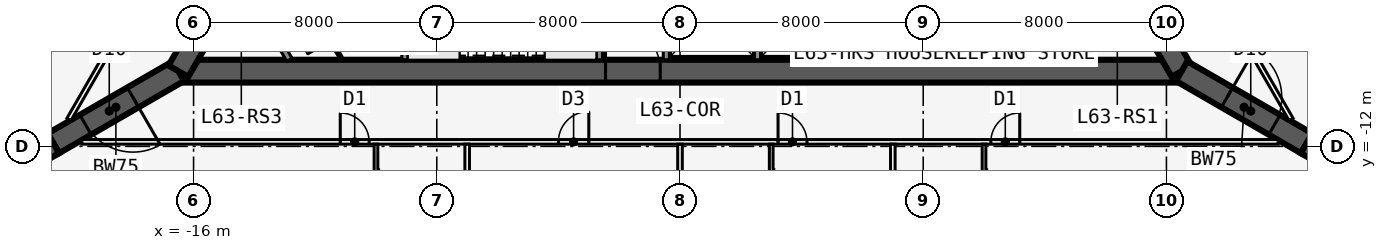
"""IFC4 building model, lengths in metres.
Left out: names, types, materials, properties, quantities, classifications, styles, units other than length and angle.
Written with IfcOpenShell. Run it as: python <this file> out.ifc"""

import sys

from ifc_helpers import new_model, si_unit, direction, frame, frame_2d, origin, place, context, subcontext, project, spatial, polyline, rectangle, outline, extrude, element, fill, save


model = new_model("IFC4")
c1 = context("Model", 3, precision=1e-05, world=origin(), true_north=direction((0.0, 1.0)))
c2 = subcontext(c1, "Body", "Model", "MODEL_VIEW")
j1 = project(units=[si_unit("LENGTHUNIT", "METRE"), si_unit("PLANEANGLEUNIT", "RADIAN")], contexts=[c1])
p1 = place(None, origin())
s1 = spatial("IfcSite", under=j1, at=p1, CompositionType="ELEMENT")
p2 = place(p1, origin())
s2 = spatial("IfcBuilding", under=s1, at=p2, CompositionType="ELEMENT")
p3 = place(p2, frame((0.0, 0.0, 239.3)))
s3 = spatial("IfcBuildingStorey", under=s2, at=p3, CompositionType="ELEMENT", Elevation=239.3)
p4 = place(p3, frame((-16.5, -9.526, 0.0), z_axis=(0.0, 0.0, 1.0), x_axis=(1.0, 0.0, 0.0)))
e1 = element("IfcWall", 1, at=p4, inside=s3, PredefinedType="SHEAR", context=c2, shape_type="SweptSolid", body=[
    extrude(rectangle(XDim=33.0, YDim=0.75, at=frame_2d((16.5, 0.0))), origin(), (0.0, 0.0, 1.0), 3.6),
])
p5 = place(p4, frame((14.05, 0.0, 0.0)))
e2 = element("IfcOpeningElement", 2, at=p5, cuts=e1, PredefinedType="OPENING", context=c2, shape_type="SweptSolid", body=[
    extrude(rectangle(XDim=1.8, YDim=2.13, at=frame_2d((0.9, 1.065))), frame((0.0, 0.385, 0.0), z_axis=(0.0, -1.0, 0.0), x_axis=(1.0, 0.0, 0.0)), (0.0, 0.0, 1.0), 0.77),
])
p6 = place(p3, frame((-9.05, -5.951, 0.0), z_axis=(0.0, 0.0, 1.0), x_axis=(0.0, -1.0, 0.0)))
e3 = element("IfcWall", 3, at=p6, inside=s3, PredefinedType="SOLIDWALL", context=c2, shape_type="SweptSolid", body=[
    extrude(rectangle(XDim=3.2, YDim=0.2, at=frame_2d((1.6, 0.0))), origin(), (0.0, 0.0, 1.0), 3.435),
])
p7 = place(p3, frame((-2.65, -5.951, 0.0), z_axis=(0.0, 0.0, 1.0), x_axis=(0.0, -1.0, 0.0)))
e4 = element("IfcWall", 4, at=p7, inside=s3, PredefinedType="SOLIDWALL", context=c2, shape_type="SweptSolid", body=[
    extrude(rectangle(XDim=3.2, YDim=0.2, at=frame_2d((1.6, 0.0))), origin(), (0.0, 0.0, 1.0), 3.435),
])
p8 = place(p7, frame((1.6, 0.0, 0.0)))
e5 = element("IfcOpeningElement", 5, at=p8, cuts=e4, PredefinedType="OPENING", context=c2, shape_type="SweptSolid", body=[
    extrude(rectangle(XDim=1.0, YDim=2.13, at=frame_2d((0.5, 1.065))), frame((0.0, 0.11, 0.0), z_axis=(0.0, -1.0, 0.0), x_axis=(1.0, 0.0, 0.0)), (0.0, 0.0, 1.0), 0.22),
])
for number, where, z_axis, x_axis in (
    (6, (-0.45, -5.951, 0.0), (0.0, 0.0, 1.0), (0.0, -1.0, 0.0)),
    (7, (2.55, -5.951, 0.0), (0.0, 0.0, 1.0), (0.0, -1.0, 0.0)),
    (8, (5.55, -5.951, 0.0), (0.0, 0.0, 1.0), (0.0, -1.0, 0.0)),
    (9, (8.45, -5.951, 0.0), (0.0, 0.0, 1.0), (0.0, -1.0, 0.0)),
):
    element("IfcWall", number, at=place(p3, frame(where, z_axis=z_axis, x_axis=x_axis)), inside=s3, PredefinedType="SOLIDWALL", context=c2, shape_type="SweptSolid", body=[
        extrude(rectangle(XDim=3.2, YDim=0.2, at=frame_2d((1.6, 0.0))), origin(), (0.0, 0.0, 1.0), 3.435),
    ])
p9 = place(p3, frame((16.5, -9.526, 0.0), z_axis=(0.0, 0.0, 1.0), x_axis=(-0.499999749417, 0.866025548458, 0.0)))
e10 = element("IfcWall", 10, at=p9, inside=s3, PredefinedType="SHEAR", context=c2, shape_type="SweptSolid", body=[
    extrude(rectangle(XDim=33.0, YDim=0.75, at=frame_2d((16.5, 0.0))), origin(), (0.0, 0.0, 1.0), 3.6),
])
p10 = place(p9, frame((14.15, 0.0, 0.0)))
e11 = element("IfcOpeningElement", 11, at=p10, cuts=e10, PredefinedType="OPENING", context=c2, shape_type="SweptSolid", body=[
    extrude(rectangle(XDim=1.8, YDim=2.13, at=frame_2d((0.9, 1.065))), frame((0.0, 0.385, 0.0), z_axis=(0.0, -1.0, 0.0), x_axis=(1.0, 0.0, 0.0)), (0.0, 0.0, 1.0), 0.77),
])
p11 = place(p9, frame((12.6, 0.0, 0.0)))
e12 = element("IfcOpeningElement", 12, at=p11, cuts=e10, PredefinedType="OPENING", context=c2, shape_type="SweptSolid", body=[
    extrude(rectangle(XDim=1.0, YDim=2.13, at=frame_2d((0.5, 1.065))), frame((0.0, 0.385, 0.0), z_axis=(0.0, -1.0, 0.0), x_axis=(1.0, 0.0, 0.0)), (0.0, 0.0, 1.0), 0.77),
])
p12 = place(p3, frame((0.0, 19.052, 0.0), z_axis=(0.0, 0.0, 1.0), x_axis=(-0.499999749417, -0.866025548458, 0.0)))
e13 = element("IfcWall", 13, at=p12, inside=s3, PredefinedType="SHEAR", context=c2, shape_type="SweptSolid", body=[
    extrude(rectangle(XDim=33.0, YDim=0.75, at=frame_2d((16.5, 0.0))), origin(), (0.0, 0.0, 1.0), 3.6),
])
p13 = place(p12, frame((14.15, 0.0, 0.0)))
e14 = element("IfcOpeningElement", 14, at=p13, cuts=e13, PredefinedType="OPENING", context=c2, shape_type="SweptSolid", body=[
    extrude(rectangle(XDim=1.8, YDim=2.13, at=frame_2d((0.9, 1.065))), frame((0.0, 0.385, 0.0), z_axis=(0.0, -1.0, 0.0), x_axis=(1.0, 0.0, 0.0)), (0.0, 0.0, 1.0), 0.77),
])
p14 = place(p12, frame((12.6, 0.0, 0.0)))
e15 = element("IfcOpeningElement", 15, at=p14, cuts=e13, PredefinedType="OPENING", context=c2, shape_type="SweptSolid", body=[
    extrude(rectangle(XDim=1.0, YDim=2.13, at=frame_2d((0.5, 1.065))), frame((0.0, 0.385, 0.0), z_axis=(0.0, -1.0, 0.0), x_axis=(1.0, 0.0, 0.0)), (0.0, 0.0, 1.0), 0.77),
])
p15 = place(p3, frame((16.5, -9.526, 0.0), z_axis=(0.0, 0.0, 1.0), x_axis=(0.866031398331, -0.499989616998, 0.0)))
e16 = element("IfcWall", 16, at=p15, inside=s3, PredefinedType="SHEAR", context=c2, shape_type="SweptSolid", body=[
    extrude(rectangle(XDim=4.746, YDim=0.75, at=frame_2d((2.373, 0.0))), origin(), (0.0, 0.0, 1.0), 3.6),
])
p16 = place(p15, frame((1.725, 0.0, 0.0)))
e17 = element("IfcOpeningElement", 17, at=p16, cuts=e16, PredefinedType="OPENING", context=c2, shape_type="SweptSolid", body=[
    extrude(rectangle(XDim=1.8, YDim=2.13, at=frame_2d((0.9, 1.065))), frame((0.0, 0.385, 0.0), z_axis=(0.0, -1.0, 0.0), x_axis=(1.0, 0.0, 0.0)), (0.0, 0.0, 1.0), 0.77),
])
p17 = place(p3, frame((20.61, -11.899, 0.0), z_axis=(0.0, 0.0, 1.0), x_axis=(0.866009537788, -0.500027479704, 0.0)))
e18 = element("IfcWall", 18, at=p17, inside=s3, PredefinedType="SHEAR", context=c2, shape_type="SweptSolid", body=[
    extrude(rectangle(XDim=1.155, YDim=0.75, at=frame_2d((0.577, 0.0))), origin(), (0.0, 0.0, 1.0), 3.6),
])
p18 = place(p3, frame((-16.5, -9.526, 0.0), z_axis=(0.0, 0.0, 1.0), x_axis=(-0.866031398331, -0.499989616998, 0.0)))
e19 = element("IfcWall", 19, at=p18, inside=s3, PredefinedType="SHEAR", context=c2, shape_type="SweptSolid", body=[
    extrude(rectangle(XDim=4.746, YDim=0.75, at=frame_2d((2.373, 0.0))), origin(), (0.0, 0.0, 1.0), 3.6),
])
p19 = place(p18, frame((1.725, 0.0, 0.0)))
e20 = element("IfcOpeningElement", 20, at=p19, cuts=e19, PredefinedType="OPENING", context=c2, shape_type="SweptSolid", body=[
    extrude(rectangle(XDim=1.8, YDim=2.13, at=frame_2d((0.9, 1.065))), frame((0.0, 0.385, 0.0), z_axis=(0.0, -1.0, 0.0), x_axis=(1.0, 0.0, 0.0)), (0.0, 0.0, 1.0), 0.77),
])
p20 = place(p3, frame((-20.61, -11.899, 0.0), z_axis=(0.0, 0.0, 1.0), x_axis=(-0.866009537788, -0.500027479704, 0.0)))
e21 = element("IfcWall", 21, at=p20, inside=s3, PredefinedType="SHEAR", context=c2, shape_type="SweptSolid", body=[
    extrude(rectangle(XDim=1.155, YDim=0.75, at=frame_2d((0.577, 0.0))), origin(), (0.0, 0.0, 1.0), 3.6),
])
p21 = place(p3, frame((18.46, -15.924, 0.0), z_axis=(0.0, 0.0, 1.0), x_axis=(0.707081252484, 0.707132308968, 0.0)))
e22 = element("IfcWall", 22, at=p21, inside=s3, PredefinedType="SOLIDWALL", context=c2, shape_type="SweptSolid", body=[
    extrude(outline(polyline([(4.782, 0.225), (4.723, 0.225), (4.303, 0.113), (4.273, 0.225), (0.0, 0.225), (0.0, -0.225), (4.782, -0.225), (4.782, 0.225)])), origin(), (0.0, 0.0, 1.0), 3.435),
])
p22 = place(p21, frame((0.711, 0.0, 0.45)))
e23 = element("IfcOpeningElement", 23, at=p22, cuts=e22, PredefinedType="OPENING", context=c2, shape_type="SweptSolid", body=[
    extrude(rectangle(XDim=3.0, YDim=2.6, at=frame_2d((1.5, 1.3))), frame((0.0, 0.235, 0.0), z_axis=(0.0, -1.0, 0.0), x_axis=(1.0, 0.0, 0.0)), (0.0, 0.0, 1.0), 0.47),
])
p23 = place(p3, frame((-21.841, -12.542, 0.0), z_axis=(0.0, 0.0, 1.0), x_axis=(0.707081252484, -0.707132308968, 0.0)))
e24 = element("IfcWall", 24, at=p23, inside=s3, PredefinedType="SOLIDWALL", context=c2, shape_type="SweptSolid", body=[
    extrude(outline(polyline([(4.782, 0.225), (0.509, 0.225), (0.479, 0.113), (0.059, 0.225), (0.0, 0.225), (0.0, -0.225), (4.782, -0.225), (4.782, 0.225)])), origin(), (0.0, 0.0, 1.0), 3.435),
])
p24 = place(p23, frame((1.07, 0.0, 0.45)))
e25 = element("IfcOpeningElement", 25, at=p24, cuts=e24, PredefinedType="OPENING", context=c2, shape_type="SweptSolid", body=[
    extrude(rectangle(XDim=3.0, YDim=2.6, at=frame_2d((1.5, 1.3))), frame((0.0, 0.235, 0.0), z_axis=(0.0, -1.0, 0.0), x_axis=(1.0, 0.0, 0.0)), (0.0, 0.0, 1.0), 0.47),
])
p25 = place(p3, frame((-19.677, -11.851, 0.0), z_axis=(0.0, 0.0, 1.0), x_axis=(1.0, 0.0, 0.0)))
e26 = element("IfcWall", 26, at=p25, inside=s3, PredefinedType="PARTITIONING", context=c2, shape_type="SweptSolid", body=[
    extrude(rectangle(XDim=39.354, YDim=0.15, at=frame_2d((19.677, 0.0))), origin(), (0.0, 0.0, 1.0), 3.435),
])
p26 = place(p25, frame((8.502, 0.0, 0.0)))
e27 = element("IfcOpeningElement", 27, at=p26, cuts=e26, PredefinedType="OPENING", context=c2, shape_type="SweptSolid", body=[
    extrude(rectangle(XDim=0.95, YDim=2.13, at=frame_2d((0.475, 1.065))), frame((0.0, 0.085, 0.0), z_axis=(0.0, -1.0, 0.0), x_axis=(1.0, 0.0, 0.0)), (0.0, 0.0, 1.0), 0.17),
])
p27 = place(p25, frame((15.677, 0.0, 0.0)))
e28 = element("IfcOpeningElement", 28, at=p27, cuts=e26, PredefinedType="OPENING", context=c2, shape_type="SweptSolid", body=[
    extrude(rectangle(XDim=1.0, YDim=2.13, at=frame_2d((0.5, 1.065))), frame((0.0, 0.085, 0.0), z_axis=(0.0, -1.0, 0.0), x_axis=(1.0, 0.0, 0.0)), (0.0, 0.0, 1.0), 0.17),
])
p28 = place(p25, frame((22.902, 0.0, 0.0)))
e29 = element("IfcOpeningElement", 29, at=p28, cuts=e26, PredefinedType="OPENING", context=c2, shape_type="SweptSolid", body=[
    extrude(rectangle(XDim=0.95, YDim=2.13, at=frame_2d((0.475, 1.065))), frame((0.0, 0.085, 0.0), z_axis=(0.0, -1.0, 0.0), x_axis=(1.0, 0.0, 0.0)), (0.0, 0.0, 1.0), 0.17),
])
p29 = place(p25, frame((29.902, 0.0, 0.0)))
e30 = element("IfcOpeningElement", 30, at=p29, cuts=e26, PredefinedType="OPENING", context=c2, shape_type="SweptSolid", body=[
    extrude(rectangle(XDim=0.95, YDim=2.13, at=frame_2d((0.475, 1.065))), frame((0.0, 0.085, 0.0), z_axis=(0.0, -1.0, 0.0), x_axis=(1.0, 0.0, 0.0)), (0.0, 0.0, 1.0), 0.17),
])
p30 = place(p3, frame((-7.0, -11.926, 0.0), z_axis=(0.0, 0.0, 1.0), x_axis=(0.0, -1.0, 0.0)))
e31 = element("IfcWall", 31, at=p30, inside=s3, PredefinedType="PARTITIONING", context=c2, shape_type="SweptSolid", body=[
    extrude(rectangle(XDim=6.609, YDim=0.15, at=frame_2d((3.304, 0.0))), origin(), (0.0, 0.0, 1.0), 2.678),
])
p31 = place(p3, frame((0.0, -11.926, 0.0), z_axis=(0.0, 0.0, 1.0), x_axis=(0.0, -1.0, 0.0)))
e32 = element("IfcWall", 32, at=p31, inside=s3, PredefinedType="PARTITIONING", context=c2, shape_type="SweptSolid", body=[
    extrude(rectangle(XDim=6.854, YDim=0.15, at=frame_2d((3.427, 0.0))), origin(), (0.0, 0.0, 1.0), 2.678),
])
p32 = place(p3, frame((7.0, -11.926, 0.0), z_axis=(0.0, 0.0, 1.0), x_axis=(0.0, -1.0, 0.0)))
e33 = element("IfcWall", 33, at=p32, inside=s3, PredefinedType="PARTITIONING", context=c2, shape_type="SweptSolid", body=[
    extrude(rectangle(XDim=6.609, YDim=0.15, at=frame_2d((3.304, 0.0))), origin(), (0.0, 0.0, 1.0), 2.678),
])
p33 = place(p3, frame((-10.0, -11.926, 0.0), z_axis=(0.0, 0.0, 1.0), x_axis=(0.0, -1.0, 0.0)))
e34 = element("IfcWall", 34, at=p33, inside=s3, PredefinedType="PLUMBINGWALL", context=c2, shape_type="SweptSolid", body=[
    extrude(rectangle(XDim=2.74, YDim=0.12, at=frame_2d((1.37, 0.0))), origin(), (0.0, 0.0, 1.0), 3.435),
])
p34 = place(p33, frame((1.55, 0.0, 0.0)))
e35 = element("IfcOpeningElement", 35, at=p34, cuts=e34, PredefinedType="OPENING", context=c2, shape_type="SweptSolid", body=[
    extrude(rectangle(XDim=0.9, YDim=2.13, at=frame_2d((0.45, 1.065))), frame((0.0, 0.07, 0.0), z_axis=(0.0, -1.0, 0.0), x_axis=(1.0, 0.0, 0.0)), (0.0, 0.0, 1.0), 0.14),
])
p35 = place(p3, frame((3.0, -11.926, 0.0), z_axis=(0.0, 0.0, 1.0), x_axis=(0.0, -1.0, 0.0)))
e36 = element("IfcWall", 36, at=p35, inside=s3, PredefinedType="PLUMBINGWALL", context=c2, shape_type="SweptSolid", body=[
    extrude(rectangle(XDim=2.74, YDim=0.12, at=frame_2d((1.37, 0.0))), origin(), (0.0, 0.0, 1.0), 3.435),
])
p36 = place(p35, frame((1.55, 0.0, 0.0)))
e37 = element("IfcOpeningElement", 37, at=p36, cuts=e36, PredefinedType="OPENING", context=c2, shape_type="SweptSolid", body=[
    extrude(rectangle(XDim=0.9, YDim=2.13, at=frame_2d((0.45, 1.065))), frame((0.0, 0.07, 0.0), z_axis=(0.0, -1.0, 0.0), x_axis=(1.0, 0.0, 0.0)), (0.0, 0.0, 1.0), 0.14),
])
p37 = place(p3, frame((10.0, -11.926, 0.0), z_axis=(0.0, 0.0, 1.0), x_axis=(0.0, -1.0, 0.0)))
e38 = element("IfcWall", 38, at=p37, inside=s3, PredefinedType="PLUMBINGWALL", context=c2, shape_type="SweptSolid", body=[
    extrude(rectangle(XDim=2.74, YDim=0.12, at=frame_2d((1.37, 0.0))), origin(), (0.0, 0.0, 1.0), 3.435),
])
p38 = place(p37, frame((1.55, 0.0, 0.0)))
e39 = element("IfcOpeningElement", 39, at=p38, cuts=e38, PredefinedType="OPENING", context=c2, shape_type="SweptSolid", body=[
    extrude(rectangle(XDim=0.9, YDim=2.13, at=frame_2d((0.45, 1.065))), frame((0.0, 0.07, 0.0), z_axis=(0.0, -1.0, 0.0), x_axis=(1.0, 0.0, 0.0)), (0.0, 0.0, 1.0), 0.14),
])
p39 = place(p3, frame((20.102, -11.115, 0.0), z_axis=(0.0, 0.0, 1.0), x_axis=(-0.500001960654, 0.866024271797, 0.0)))
e40 = element("IfcWall", 40, at=p39, inside=s3, PredefinedType="PARTITIONING", context=c2, shape_type="SweptSolid", body=[
    extrude(rectangle(XDim=12.677, YDim=0.15, at=frame_2d((6.339, 0.0))), origin(), (0.0, 0.0, 1.0), 3.435),
])
p40 = place(p39, frame((8.502, 0.0, 0.0)))
e41 = element("IfcOpeningElement", 41, at=p40, cuts=e40, PredefinedType="OPENING", context=c2, shape_type="SweptSolid", body=[
    extrude(rectangle(XDim=0.95, YDim=2.13, at=frame_2d((0.475, 1.065))), frame((0.0, 0.085, 0.0), z_axis=(0.0, -1.0, 0.0), x_axis=(1.0, 0.0, 0.0)), (0.0, 0.0, 1.0), 0.17),
])
p41 = place(p3, frame((-0.425, 22.966, 0.0), z_axis=(0.0, 0.0, 1.0), x_axis=(-0.500000265775, -0.866025250339, 0.0)))
e42 = element("IfcWall", 42, at=p41, inside=s3, PredefinedType="PARTITIONING", context=c2, shape_type="SweptSolid", body=[
    extrude(rectangle(XDim=39.354, YDim=0.15, at=frame_2d((19.677, 0.0))), origin(), (0.0, 0.0, 1.0), 3.435),
])
p42 = place(p41, frame((8.502, 0.0, 0.0)))
e43 = element("IfcOpeningElement", 43, at=p42, cuts=e42, PredefinedType="OPENING", context=c2, shape_type="SweptSolid", body=[
    extrude(rectangle(XDim=0.95, YDim=2.13, at=frame_2d((0.475, 1.065))), frame((0.0, 0.085, 0.0), z_axis=(0.0, -1.0, 0.0), x_axis=(1.0, 0.0, 0.0)), (0.0, 0.0, 1.0), 0.17),
])
p43 = place(p41, frame((15.902, 0.0, 0.0)))
e44 = element("IfcOpeningElement", 44, at=p43, cuts=e42, PredefinedType="OPENING", context=c2, shape_type="SweptSolid", body=[
    extrude(rectangle(XDim=0.95, YDim=2.13, at=frame_2d((0.475, 1.065))), frame((0.0, 0.085, 0.0), z_axis=(0.0, -1.0, 0.0), x_axis=(1.0, 0.0, 0.0)), (0.0, 0.0, 1.0), 0.17),
])
p44 = place(p41, frame((22.902, 0.0, 0.0)))
e45 = element("IfcOpeningElement", 45, at=p44, cuts=e42, PredefinedType="OPENING", context=c2, shape_type="SweptSolid", body=[
    extrude(rectangle(XDim=0.95, YDim=2.13, at=frame_2d((0.475, 1.065))), frame((0.0, 0.085, 0.0), z_axis=(0.0, -1.0, 0.0), x_axis=(1.0, 0.0, 0.0)), (0.0, 0.0, 1.0), 0.17),
])
p45 = place(p41, frame((29.902, 0.0, 0.0)))
e46 = element("IfcOpeningElement", 46, at=p45, cuts=e42, PredefinedType="OPENING", context=c2, shape_type="SweptSolid", body=[
    extrude(rectangle(XDim=0.95, YDim=2.13, at=frame_2d((0.475, 1.065))), frame((0.0, 0.085, 0.0), z_axis=(0.0, -1.0, 0.0), x_axis=(1.0, 0.0, 0.0)), (0.0, 0.0, 1.0), 0.17),
])
p46 = place(p3, frame((14.349, -6.551, 0.0), z_axis=(0.0, 0.0, 1.0), x_axis=(-0.499952404951, -0.866052881055, 0.0)))
e47 = element("IfcWall", 47, at=p46, inside=s3, PredefinedType="SOLIDWALL", context=c2, shape_type="SweptSolid", body=[
    extrude(rectangle(XDim=3.002, YDim=0.2, at=frame_2d((1.501, 0.0))), origin(), (0.0, 0.0, 1.0), 3.435),
])
p47 = place(p3, frame((12.964, -4.151, 0.0), z_axis=(0.0, 0.0, 1.0), x_axis=(-0.500027479704, -0.866009537788, 0.0)))
e48 = element("IfcWall", 48, at=p47, inside=s3, PredefinedType="PARTITIONING", context=c2, shape_type="SweptSolid", body=[
    extrude(rectangle(XDim=5.774, YDim=0.1, at=frame_2d((2.887, 0.0))), origin(), (0.0, 0.0, 1.0), 3.435),
])
p48 = place(p47, frame((2.437, 0.0, 0.0)))
e49 = element("IfcOpeningElement", 49, at=p48, cuts=e48, PredefinedType="OPENING", context=c2, shape_type="SweptSolid", body=[
    extrude(rectangle(XDim=0.9, YDim=2.13, at=frame_2d((0.45, 1.065))), frame((0.0, 0.06, 0.0), z_axis=(0.0, -1.0, 0.0), x_axis=(1.0, 0.0, 0.0)), (0.0, 0.0, 1.0), 0.12),
])
p49 = place(p3, frame((-12.848, -9.151, 0.0), z_axis=(0.0, 0.0, 1.0), x_axis=(-0.499952404951, 0.866052881055, 0.0)))
e50 = element("IfcWall", 50, at=p49, inside=s3, PredefinedType="SOLIDWALL", context=c2, shape_type="SweptSolid", body=[
    extrude(rectangle(XDim=3.002, YDim=0.2, at=frame_2d((1.501, 0.0))), origin(), (0.0, 0.0, 1.0), 3.435),
])
p50 = place(p3, frame((-11.116, -9.151, 0.0), z_axis=(0.0, 0.0, 1.0), x_axis=(-0.499999210213, 0.866025859768, 0.0)))
e51 = element("IfcWall", 51, at=p50, inside=s3, PredefinedType="PARTITIONING", context=c2, shape_type="SweptSolid", body=[
    extrude(rectangle(XDim=4.734, YDim=0.1, at=frame_2d((2.367, 0.0))), origin(), (0.0, 0.0, 1.0), 3.435),
])
p51 = place(p50, frame((0.734, 0.0, 0.0)))
e52 = element("IfcOpeningElement", 52, at=p51, cuts=e51, PredefinedType="OPENING", context=c2, shape_type="SweptSolid", body=[
    extrude(rectangle(XDim=0.9, YDim=2.13, at=frame_2d((0.45, 1.065))), frame((0.0, 0.06, 0.0), z_axis=(0.0, -1.0, 0.0), x_axis=(1.0, 0.0, 0.0)), (0.0, 0.0, 1.0), 0.12),
])
p52 = place(p26, origin())
e53 = element("IfcDoor", 53, at=p52, inside=s3, OperationType="SINGLE_SWING_LEFT", PredefinedType="DOOR", context=c2, shape_type="SweptSolid", body=[
    extrude(rectangle(XDim=0.95, YDim=2.13, at=frame_2d((0.475, 1.065))), frame((0.0, 0.025, 0.0), z_axis=(0.0, -1.0, 0.0), x_axis=(1.0, 0.0, 0.0)), (0.0, 0.0, 1.0), 0.05),
])
fill(e27, e53)
p53 = place(p27, origin())
e54 = element("IfcDoor", 54, at=p53, inside=s3, OperationType="SINGLE_SWING_RIGHT", PredefinedType="DOOR", context=c2, shape_type="SweptSolid", body=[
    extrude(rectangle(XDim=1.0, YDim=2.13, at=frame_2d((0.5, 1.065))), frame((0.0, 0.025, 0.0), z_axis=(0.0, -1.0, 0.0), x_axis=(1.0, 0.0, 0.0)), (0.0, 0.0, 1.0), 0.05),
])
fill(e28, e54)
p54 = place(p28, origin())
e55 = element("IfcDoor", 55, at=p54, inside=s3, OperationType="SINGLE_SWING_LEFT", PredefinedType="DOOR", context=c2, shape_type="SweptSolid", body=[
    extrude(rectangle(XDim=0.95, YDim=2.13, at=frame_2d((0.475, 1.065))), frame((0.0, 0.025, 0.0), z_axis=(0.0, -1.0, 0.0), x_axis=(1.0, 0.0, 0.0)), (0.0, 0.0, 1.0), 0.05),
])
fill(e29, e55)
p55 = place(p29, origin())
e56 = element("IfcDoor", 56, at=p55, inside=s3, OperationType="SINGLE_SWING_RIGHT", PredefinedType="DOOR", context=c2, shape_type="SweptSolid", body=[
    extrude(rectangle(XDim=0.95, YDim=2.13, at=frame_2d((0.475, 1.065))), frame((0.0, 0.025, 0.0), z_axis=(0.0, -1.0, 0.0), x_axis=(1.0, 0.0, 0.0)), (0.0, 0.0, 1.0), 0.05),
])
fill(e30, e56)
p56 = place(p5, origin())
e57 = element("IfcDoor", 57, at=p56, inside=s3, OperationType="DOUBLE_DOOR_SINGLE_SWING", PredefinedType="DOOR", context=c2, shape_type="SweptSolid", body=[
    extrude(rectangle(XDim=1.8, YDim=2.13, at=frame_2d((0.9, 1.065))), frame((0.0, 0.025, 0.0), z_axis=(0.0, -1.0, 0.0), x_axis=(1.0, 0.0, 0.0)), (0.0, 0.0, 1.0), 0.05),
])
fill(e2, e57)
p57 = place(p16, origin())
e58 = element("IfcDoor", 58, at=p57, inside=s3, OperationType="DOUBLE_DOOR_DOUBLE_SWING", PredefinedType="DOOR", context=c2, shape_type="SweptSolid", body=[
    extrude(rectangle(XDim=1.8, YDim=2.13, at=frame_2d((0.9, 1.065))), frame((0.0, 0.025, 0.0), z_axis=(0.0, -1.0, 0.0), x_axis=(1.0, 0.0, 0.0)), (0.0, 0.0, 1.0), 0.05),
])
fill(e17, e58)
p58 = place(p19, origin())
e59 = element("IfcDoor", 59, at=p58, inside=s3, OperationType="DOUBLE_DOOR_DOUBLE_SWING", PredefinedType="DOOR", context=c2, shape_type="SweptSolid", body=[
    extrude(rectangle(XDim=1.8, YDim=2.13, at=frame_2d((0.9, 1.065))), frame((0.0, 0.025, 0.0), z_axis=(0.0, -1.0, 0.0), x_axis=(1.0, 0.0, 0.0)), (0.0, 0.0, 1.0), 0.05),
])
fill(e20, e59)
save(model, sys.argv[1])
